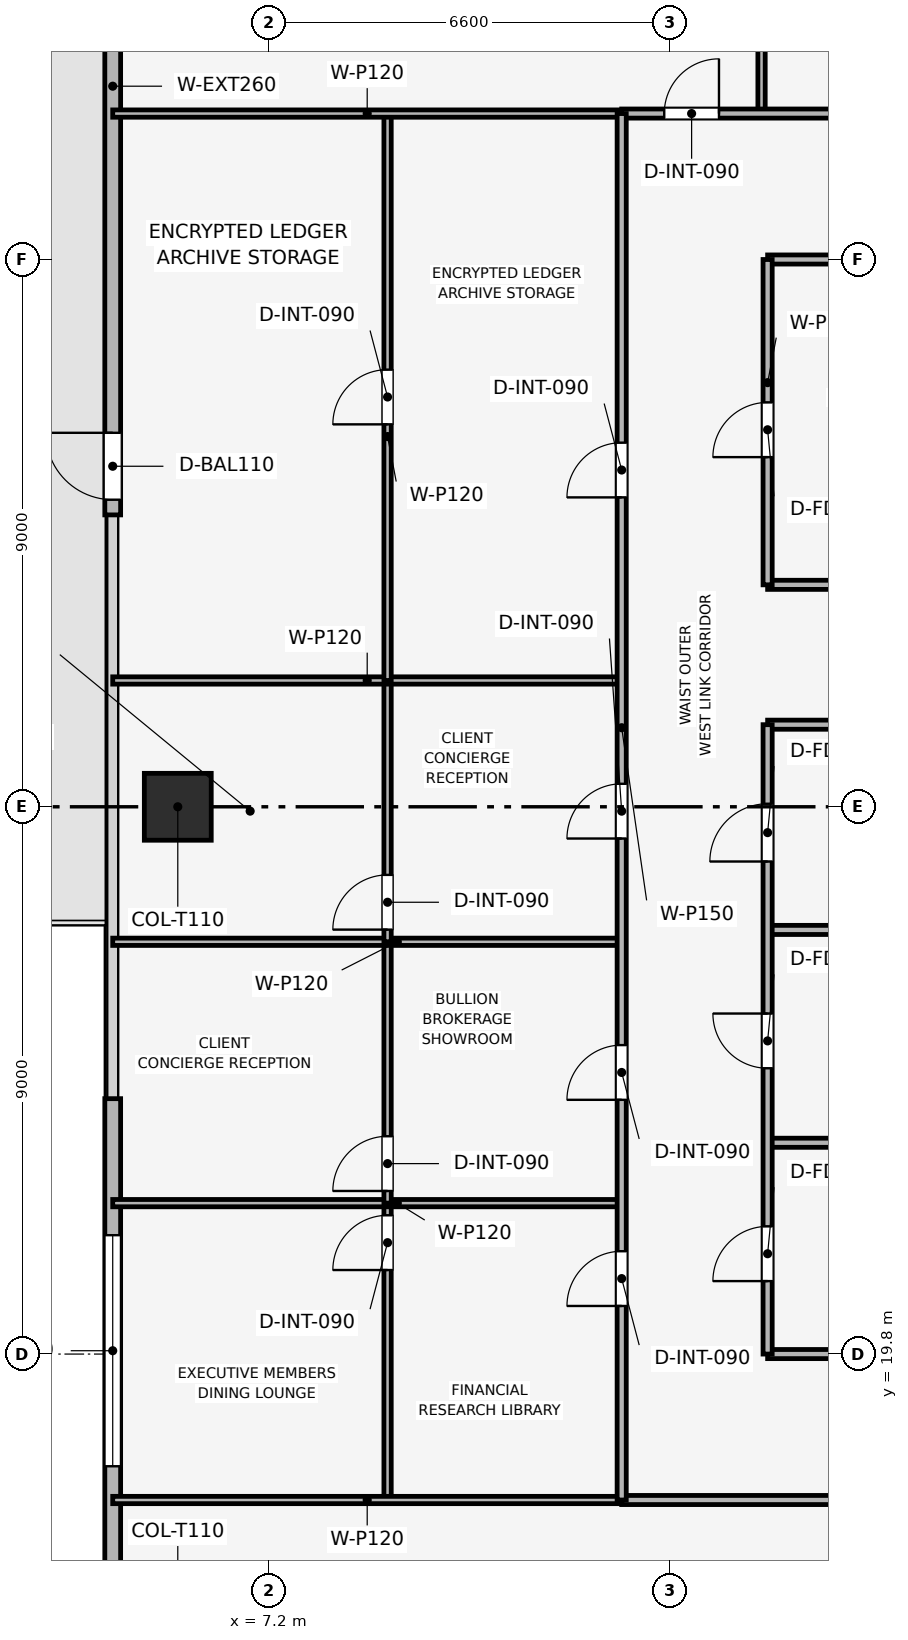
"""IFC4 building model, lengths in metres.
Left out: names, types, materials, properties, quantities, classifications, styles, units other than length and angle.
Written with IfcOpenShell. Run it as: python <this file> out.ifc"""

import sys

from ifc_helpers import new_model, si_unit, direction, frame, frame_2d, origin, origin_2d, place, context, subcontext, project, spatial, rectangle, extrude, element, fill, save


model = new_model("IFC4")
c1 = context("Model", 3, precision=1e-05, world=origin(), true_north=direction((0.0, 1.0)))
c2 = subcontext(c1, "Body", "Model", "MODEL_VIEW")
j1 = project(units=[si_unit("LENGTHUNIT", "METRE"), si_unit("PLANEANGLEUNIT", "RADIAN")], contexts=[c1])
p1 = place(None, origin())
s1 = spatial("IfcSite", under=j1, at=p1, CompositionType="ELEMENT")
p2 = place(p1, origin())
s2 = spatial("IfcBuilding", under=s1, at=p2, CompositionType="ELEMENT")
p3 = place(p2, frame((0.0, 0.0, 172.05)))
s3 = spatial("IfcBuildingStorey", under=s2, at=p3, CompositionType="ELEMENT", Elevation=172.05)
p4 = place(p3, frame((5.7, 28.8, 0.003), z_axis=(0.0, 0.0, 1.0), x_axis=(1.0, 0.0, 0.0)))
e1 = element("IfcColumn", 1, at=p4, inside=s3, PredefinedType="COLUMN", context=c2, shape_type="SweptSolid", body=[
    extrude(rectangle(XDim=1.1, YDim=1.1, at=origin_2d()), origin(), (0.0, 0.0, 1.0), 3.489),
])
p5 = place(p3, frame((4.63, 11.4, 0.0), z_axis=(0.0, 0.0, 1.0), x_axis=(0.0, 1.0, 0.0)))
e2 = element("IfcWall", 2, at=p5, inside=s3, PredefinedType="SOLIDWALL", context=c2, shape_type="SweptSolid", body=[
    extrude(rectangle(XDim=12.6, YDim=0.26, at=frame_2d((6.3, 0.0))), origin(), (0.0, 0.0, 1.0), 3.495),
])
p6 = place(p5, frame((6.555, 0.0, 0.9)))
e3 = element("IfcOpeningElement", 3, at=p6, cuts=e2, PredefinedType="OPENING", context=c2, shape_type="SweptSolid", body=[
    extrude(rectangle(XDim=3.8, YDim=1.9, at=frame_2d((1.9, 0.95))), frame((0.0, 0.14, 0.0), z_axis=(0.0, -1.0, 0.0), x_axis=(1.0, 0.0, 0.0)), (0.0, 0.0, 1.0), 0.28),
])
p7 = place(p3, frame((4.63, 33.6, 0.0), z_axis=(0.0, 0.0, 1.0), x_axis=(0.0, 1.0, 0.0)))
e4 = element("IfcWall", 4, at=p7, inside=s3, PredefinedType="SOLIDWALL", context=c2, shape_type="SweptSolid", body=[
    extrude(rectangle(XDim=12.6, YDim=0.26, at=frame_2d((6.3, 0.0))), origin(), (0.0, 0.0, 1.0), 3.495),
])
p8 = place(p7, frame((0.25, 0.0, 0.0)))
e5 = element("IfcOpeningElement", 5, at=p8, cuts=e4, PredefinedType="OPENING", context=c2, shape_type="SweptSolid", body=[
    extrude(rectangle(XDim=1.1, YDim=2.2, at=frame_2d((0.55, 1.1))), frame((0.0, 0.14, 0.0), z_axis=(0.0, -1.0, 0.0), x_axis=(1.0, 0.0, 0.0)), (0.0, 0.0, 1.0), 0.28),
])
p9 = place(p3, frame((15.4, 19.8, 0.0), z_axis=(0.0, 0.0, 1.0), x_axis=(1.0, 0.0, 0.0)))
e6 = element("IfcWall", 6, at=p9, inside=s3, PredefinedType="PARTITIONING", context=c2, shape_type="SweptSolid", body=[
    extrude(rectangle(XDim=4.4, YDim=0.15, at=frame_2d((2.2, 0.0))), origin(), (0.0, 0.0, 1.0), 3.03),
])
for number, where, z_axis, x_axis in (
    (7, (15.4, 23.275, 0.0), (0.0, 0.0, 1.0), (1.0, 0.0, 0.0)),
    (8, (15.4, 26.775, 0.0), (0.0, 0.0, 1.0), (1.0, 0.0, 0.0)),
    (9, (15.4, 30.15, 0.0), (0.0, 0.0, 1.0), (1.0, 0.0, 0.0)),
    (10, (15.4, 32.45, 0.0), (0.0, 0.0, 1.0), (1.0, 0.0, 0.0)),
):
    element("IfcWall", number, at=place(p3, frame(where, z_axis=z_axis, x_axis=x_axis)), inside=s3, PredefinedType="PARTITIONING", context=c2, shape_type="SweptSolid", body=[
        extrude(rectangle(XDim=4.4, YDim=0.15, at=frame_2d((2.2, 0.0))), origin(), (0.0, 0.0, 1.0), 3.495),
    ])
p10 = place(p3, frame((15.4, 37.8, 0.0), z_axis=(0.0, 0.0, 1.0), x_axis=(1.0, 0.0, 0.0)))
e11 = element("IfcWall", 11, at=p10, inside=s3, PredefinedType="PARTITIONING", context=c2, shape_type="SweptSolid", body=[
    extrude(rectangle(XDim=4.4, YDim=0.15, at=frame_2d((2.2, 0.0))), origin(), (0.0, 0.0, 1.0), 3.03),
])
p11 = place(p3, frame((15.4, 19.8, 0.0), z_axis=(0.0, 0.0, 1.0), x_axis=(0.0, 1.0, 0.0)))
e12 = element("IfcWall", 12, at=p11, inside=s3, PredefinedType="PARTITIONING", context=c2, shape_type="SweptSolid", body=[
    extrude(rectangle(XDim=10.35, YDim=0.15, at=frame_2d((5.175, 0.0))), origin(), (0.0, 0.0, 1.0), 3.03),
])
p12 = place(p11, frame((1.2, 0.0, 0.0)))
e13 = element("IfcOpeningElement", 13, at=p12, cuts=e12, PredefinedType="OPENING", context=c2, shape_type="SweptSolid", body=[
    extrude(rectangle(XDim=0.9, YDim=2.1, at=frame_2d((0.45, 1.05))), frame((0.0, 0.085, 0.0), z_axis=(0.0, -1.0, 0.0), x_axis=(1.0, 0.0, 0.0)), (0.0, 0.0, 1.0), 0.17),
])
p13 = place(p11, frame((4.7, 0.0, 0.0)))
e14 = element("IfcOpeningElement", 14, at=p13, cuts=e12, PredefinedType="OPENING", context=c2, shape_type="SweptSolid", body=[
    extrude(rectangle(XDim=0.9, YDim=2.1, at=frame_2d((0.45, 1.05))), frame((0.0, 0.085, 0.0), z_axis=(0.0, -1.0, 0.0), x_axis=(1.0, 0.0, 0.0)), (0.0, 0.0, 1.0), 0.17),
])
p14 = place(p11, frame((8.1, 0.0, 0.0)))
e15 = element("IfcOpeningElement", 15, at=p14, cuts=e12, PredefinedType="OPENING", context=c2, shape_type="SweptSolid", body=[
    extrude(rectangle(XDim=0.95, YDim=2.1, at=frame_2d((0.475, 1.05))), frame((0.0, 0.085, 0.0), z_axis=(0.0, -1.0, 0.0), x_axis=(1.0, 0.0, 0.0)), (0.0, 0.0, 1.0), 0.17),
])
p15 = place(p3, frame((15.4, 32.45, 0.0), z_axis=(0.0, 0.0, 1.0), x_axis=(0.0, 1.0, 0.0)))
e16 = element("IfcWall", 16, at=p15, inside=s3, PredefinedType="PARTITIONING", context=c2, shape_type="SweptSolid", body=[
    extrude(rectangle(XDim=5.35, YDim=0.15, at=frame_2d((2.675, 0.0))), origin(), (0.0, 0.0, 1.0), 3.03),
])
p16 = place(p15, frame((2.1, 0.0, 0.0)))
e17 = element("IfcOpeningElement", 17, at=p16, cuts=e16, PredefinedType="OPENING", context=c2, shape_type="SweptSolid", body=[
    extrude(rectangle(XDim=0.9, YDim=2.1, at=frame_2d((0.45, 1.05))), frame((0.0, 0.085, 0.0), z_axis=(0.0, -1.0, 0.0), x_axis=(1.0, 0.0, 0.0)), (0.0, 0.0, 1.0), 0.17),
])
p17 = place(p3, frame((15.3, 40.2, 0.0), z_axis=(0.0, 0.0, 1.0), x_axis=(0.0, 1.0, 0.0)))
e18 = element("IfcWall", 18, at=p17, inside=s3, PredefinedType="PARTITIONING", context=c2, shape_type="SweptSolid", body=[
    extrude(rectangle(XDim=12.77, YDim=0.12, at=frame_2d((6.385, 0.0))), origin(), (0.0, 0.0, 1.0), 2.98),
])
p18 = place(p3, frame((9.15, 17.4, 0.0), z_axis=(0.0, 0.0, 1.0), x_axis=(0.0, 1.0, 0.0)))
e19 = element("IfcWall", 19, at=p18, inside=s3, PredefinedType="PARTITIONING", context=c2, shape_type="SweptSolid", body=[
    extrude(rectangle(XDim=4.882, YDim=0.12, at=frame_2d((2.441, 0.0))), origin(), (0.0, 0.0, 1.0), 3.03),
])
p19 = place(p18, frame((3.782, 0.0, 0.0)))
e20 = element("IfcOpeningElement", 20, at=p19, cuts=e19, PredefinedType="OPENING", context=c2, shape_type="SweptSolid", body=[
    extrude(rectangle(XDim=0.9, YDim=2.1, at=frame_2d((0.45, 1.05))), frame((0.0, 0.07, 0.0), z_axis=(0.0, -1.0, 0.0), x_axis=(1.0, 0.0, 0.0)), (0.0, 0.0, 1.0), 0.14),
])
p20 = place(p3, frame((4.63, 22.282, 0.0), z_axis=(0.0, 0.0, 1.0), x_axis=(1.0, 0.0, 0.0)))
e21 = element("IfcWall", 21, at=p20, inside=s3, PredefinedType="PARTITIONING", context=c2, shape_type="SweptSolid", body=[
    extrude(rectangle(XDim=8.37, YDim=0.12, at=frame_2d((4.185, 0.0))), origin(), (0.0, 0.0, 1.0), 2.98),
])
p21 = place(p3, frame((9.15, 22.282, 0.0), z_axis=(0.0, 0.0, 1.0), x_axis=(0.0, 1.0, 0.0)))
e22 = element("IfcWall", 22, at=p21, inside=s3, PredefinedType="PARTITIONING", context=c2, shape_type="SweptSolid", body=[
    extrude(rectangle(XDim=4.298, YDim=0.12, at=frame_2d((2.149, 0.0))), origin(), (0.0, 0.0, 1.0), 3.495),
])
p22 = place(p21, frame((0.2, 0.0, 0.0)))
e23 = element("IfcOpeningElement", 23, at=p22, cuts=e22, PredefinedType="OPENING", context=c2, shape_type="SweptSolid", body=[
    extrude(rectangle(XDim=0.9, YDim=2.1, at=frame_2d((0.45, 1.05))), frame((0.0, 0.07, 0.0), z_axis=(0.0, -1.0, 0.0), x_axis=(1.0, 0.0, 0.0)), (0.0, 0.0, 1.0), 0.14),
])
p23 = place(p3, frame((4.63, 26.58, 0.0), z_axis=(0.0, 0.0, 1.0), x_axis=(1.0, 0.0, 0.0)))
e24 = element("IfcWall", 24, at=p23, inside=s3, PredefinedType="PARTITIONING", context=c2, shape_type="SweptSolid", body=[
    extrude(rectangle(XDim=8.37, YDim=0.12, at=frame_2d((4.185, 0.0))), origin(), (0.0, 0.0, 1.0), 2.98),
])
p24 = place(p3, frame((9.15, 26.58, 0.0), z_axis=(0.0, 0.0, 1.0), x_axis=(0.0, 1.0, 0.0)))
e25 = element("IfcWall", 25, at=p24, inside=s3, PredefinedType="PARTITIONING", context=c2, shape_type="SweptSolid", body=[
    extrude(rectangle(XDim=4.297, YDim=0.12, at=frame_2d((2.148, 0.0))), origin(), (0.0, 0.0, 1.0), 3.03),
])
p25 = place(p24, frame((0.2, 0.0, 0.0)))
e26 = element("IfcOpeningElement", 26, at=p25, cuts=e25, PredefinedType="OPENING", context=c2, shape_type="SweptSolid", body=[
    extrude(rectangle(XDim=0.9, YDim=2.1, at=frame_2d((0.45, 1.05))), frame((0.0, 0.07, 0.0), z_axis=(0.0, -1.0, 0.0), x_axis=(1.0, 0.0, 0.0)), (0.0, 0.0, 1.0), 0.14),
])
p26 = place(p3, frame((4.63, 30.877, 0.0), z_axis=(0.0, 0.0, 1.0), x_axis=(1.0, 0.0, 0.0)))
e27 = element("IfcWall", 27, at=p26, inside=s3, PredefinedType="PARTITIONING", context=c2, shape_type="SweptSolid", body=[
    extrude(rectangle(XDim=8.37, YDim=0.12, at=frame_2d((4.185, 0.0))), origin(), (0.0, 0.0, 1.0), 2.98),
])
p27 = place(p3, frame((9.15, 30.877, 0.0), z_axis=(0.0, 0.0, 1.0), x_axis=(0.0, 1.0, 0.0)))
e28 = element("IfcWall", 28, at=p27, inside=s3, PredefinedType="PARTITIONING", context=c2, shape_type="SweptSolid", body=[
    extrude(rectangle(XDim=9.323, YDim=0.12, at=frame_2d((4.662, 0.0))), origin(), (0.0, 0.0, 1.0), 3.03),
])
p28 = place(p27, frame((4.212, 0.0, 0.0)))
e29 = element("IfcOpeningElement", 29, at=p28, cuts=e28, PredefinedType="OPENING", context=c2, shape_type="SweptSolid", body=[
    extrude(rectangle(XDim=0.9, YDim=2.1, at=frame_2d((0.45, 1.05))), frame((0.0, 0.07, 0.0), z_axis=(0.0, -1.0, 0.0), x_axis=(1.0, 0.0, 0.0)), (0.0, 0.0, 1.0), 0.14),
])
for number, where, z_axis, x_axis in (
    (30, (4.63, 17.4, 0.0), (0.0, 0.0, 1.0), (1.0, 0.0, 0.0)),
    (31, (4.63, 40.2, 0.0), (0.0, 0.0, 1.0), (1.0, 0.0, 0.0)),
):
    element("IfcWall", number, at=place(p3, frame(where, z_axis=z_axis, x_axis=x_axis)), inside=s3, PredefinedType="PARTITIONING", context=c2, shape_type="SweptSolid", body=[
        extrude(rectangle(XDim=8.37, YDim=0.12, at=frame_2d((4.185, 0.0))), origin(), (0.0, 0.0, 1.0), 2.98),
    ])
p29 = place(p3, frame((13.0, 17.4, 0.0), z_axis=(0.0, 0.0, 1.0), x_axis=(1.0, 0.0, 0.0)))
e32 = element("IfcWall", 32, at=p29, inside=s3, PredefinedType="PARTITIONING", context=c2, shape_type="SweptSolid", body=[
    extrude(rectangle(XDim=31.6, YDim=0.15, at=frame_2d((15.8, 0.0))), origin(), (0.0, 0.0, 1.0), 3.03),
])
p30 = place(p29, frame((15.35, 0.0, 0.0)))
e33 = element("IfcOpeningElement", 33, at=p30, cuts=e32, PredefinedType="OPENING", context=c2, shape_type="SweptSolid", body=[
    extrude(rectangle(XDim=0.9, YDim=2.1, at=frame_2d((0.45, 1.05))), frame((0.0, 0.085, 0.0), z_axis=(0.0, -1.0, 0.0), x_axis=(1.0, 0.0, 0.0)), (0.0, 0.0, 1.0), 0.17),
])
p31 = place(p3, frame((13.0, 40.2, 0.0), z_axis=(0.0, 0.0, 1.0), x_axis=(1.0, 0.0, 0.0)))
e34 = element("IfcWall", 34, at=p31, inside=s3, PredefinedType="PARTITIONING", context=c2, shape_type="SweptSolid", body=[
    extrude(rectangle(XDim=31.6, YDim=0.15, at=frame_2d((15.8, 0.0))), origin(), (0.0, 0.0, 1.0), 3.03),
])
p32 = place(p31, frame((0.7, 0.0, 0.0)))
e35 = element("IfcOpeningElement", 35, at=p32, cuts=e34, PredefinedType="OPENING", context=c2, shape_type="SweptSolid", body=[
    extrude(rectangle(XDim=0.9, YDim=2.1, at=frame_2d((0.45, 1.05))), frame((0.0, 0.085, 0.0), z_axis=(0.0, -1.0, 0.0), x_axis=(1.0, 0.0, 0.0)), (0.0, 0.0, 1.0), 0.17),
])
p33 = place(p31, frame((8.515, 0.0, 0.0)))
e36 = element("IfcOpeningElement", 36, at=p33, cuts=e34, PredefinedType="OPENING", context=c2, shape_type="SweptSolid", body=[
    extrude(rectangle(XDim=0.9, YDim=2.1, at=frame_2d((0.45, 1.05))), frame((0.0, 0.085, 0.0), z_axis=(0.0, -1.0, 0.0), x_axis=(1.0, 0.0, 0.0)), (0.0, 0.0, 1.0), 0.17),
])
p34 = place(p31, frame((23.165, 0.0, 0.0)))
e37 = element("IfcOpeningElement", 37, at=p34, cuts=e34, PredefinedType="OPENING", context=c2, shape_type="SweptSolid", body=[
    extrude(rectangle(XDim=0.9, YDim=2.1, at=frame_2d((0.45, 1.05))), frame((0.0, 0.085, 0.0), z_axis=(0.0, -1.0, 0.0), x_axis=(1.0, 0.0, 0.0)), (0.0, 0.0, 1.0), 0.17),
])
p35 = place(p3, frame((13.0, 17.4, 0.0), z_axis=(0.0, 0.0, 1.0), x_axis=(0.0, 1.0, 0.0)))
e38 = element("IfcWall", 38, at=p35, inside=s3, PredefinedType="PARTITIONING", context=c2, shape_type="SweptSolid", body=[
    extrude(rectangle(XDim=22.8, YDim=0.15, at=frame_2d((11.4, 0.0))), origin(), (0.0, 0.0, 1.0), 3.03),
])
p36 = place(p35, frame((3.191, 0.0, 0.0)))
e39 = element("IfcOpeningElement", 39, at=p36, cuts=e38, PredefinedType="OPENING", context=c2, shape_type="SweptSolid", body=[
    extrude(rectangle(XDim=0.9, YDim=2.1, at=frame_2d((0.45, 1.05))), frame((0.0, 0.085, 0.0), z_axis=(0.0, -1.0, 0.0), x_axis=(1.0, 0.0, 0.0)), (0.0, 0.0, 1.0), 0.17),
])
p37 = place(p35, frame((6.581, 0.0, 0.0)))
e40 = element("IfcOpeningElement", 40, at=p37, cuts=e38, PredefinedType="OPENING", context=c2, shape_type="SweptSolid", body=[
    extrude(rectangle(XDim=0.9, YDim=2.1, at=frame_2d((0.45, 1.05))), frame((0.0, 0.085, 0.0), z_axis=(0.0, -1.0, 0.0), x_axis=(1.0, 0.0, 0.0)), (0.0, 0.0, 1.0), 0.17),
])
p38 = place(p35, frame((10.878, 0.0, 0.0)))
e41 = element("IfcOpeningElement", 41, at=p38, cuts=e38, PredefinedType="OPENING", context=c2, shape_type="SweptSolid", body=[
    extrude(rectangle(XDim=0.9, YDim=2.1, at=frame_2d((0.45, 1.05))), frame((0.0, 0.085, 0.0), z_axis=(0.0, -1.0, 0.0), x_axis=(1.0, 0.0, 0.0)), (0.0, 0.0, 1.0), 0.17),
])
p39 = place(p35, frame((16.488, 0.0, 0.0)))
e42 = element("IfcOpeningElement", 42, at=p39, cuts=e38, PredefinedType="OPENING", context=c2, shape_type="SweptSolid", body=[
    extrude(rectangle(XDim=0.9, YDim=2.1, at=frame_2d((0.45, 1.05))), frame((0.0, 0.085, 0.0), z_axis=(0.0, -1.0, 0.0), x_axis=(1.0, 0.0, 0.0)), (0.0, 0.0, 1.0), 0.17),
])
p40 = place(p8, origin())
e43 = element("IfcDoor", 43, at=p40, inside=s3, OperationType="SINGLE_SWING_RIGHT", PredefinedType="DOOR", context=c2, shape_type="SweptSolid", body=[
    extrude(rectangle(XDim=1.1, YDim=2.2, at=frame_2d((0.55, 1.1))), frame((0.0, 0.025, 0.0), z_axis=(0.0, -1.0, 0.0), x_axis=(1.0, 0.0, 0.0)), (0.0, 0.0, 1.0), 0.05),
])
fill(e5, e43)
p41 = place(p6, origin())
e44 = element("IfcWindow", 44, at=p41, inside=s3, PartitioningType="SINGLE_PANEL", PredefinedType="WINDOW", context=c2, shape_type="SweptSolid", body=[
    extrude(rectangle(XDim=3.8, YDim=1.9, at=frame_2d((1.9, 0.95))), frame((0.0, 0.03, 0.0), z_axis=(0.0, -1.0, 0.0), x_axis=(1.0, 0.0, 0.0)), (0.0, 0.0, 1.0), 0.06),
])
fill(e3, e44)
p42 = place(p12, origin())
e45 = element("IfcDoor", 45, at=p42, inside=s3, OperationType="SINGLE_SWING_LEFT", PredefinedType="DOOR", context=c2, shape_type="SweptSolid", body=[
    extrude(rectangle(XDim=0.9, YDim=2.1, at=frame_2d((0.45, 1.05))), frame((0.0, 0.025, 0.0), z_axis=(0.0, -1.0, 0.0), x_axis=(1.0, 0.0, 0.0)), (0.0, 0.0, 1.0), 0.05),
])
fill(e13, e45)
p43 = place(p13, origin())
e46 = element("IfcDoor", 46, at=p43, inside=s3, OperationType="SINGLE_SWING_RIGHT", PredefinedType="DOOR", context=c2, shape_type="SweptSolid", body=[
    extrude(rectangle(XDim=0.9, YDim=2.1, at=frame_2d((0.45, 1.05))), frame((0.0, 0.025, 0.0), z_axis=(0.0, -1.0, 0.0), x_axis=(1.0, 0.0, 0.0)), (0.0, 0.0, 1.0), 0.05),
])
fill(e14, e46)
p44 = place(p14, origin())
e47 = element("IfcDoor", 47, at=p44, inside=s3, OperationType="SINGLE_SWING_LEFT", PredefinedType="DOOR", context=c2, shape_type="SweptSolid", body=[
    extrude(rectangle(XDim=0.95, YDim=2.1, at=frame_2d((0.475, 1.05))), frame((0.0, 0.025, 0.0), z_axis=(0.0, -1.0, 0.0), x_axis=(1.0, 0.0, 0.0)), (0.0, 0.0, 1.0), 0.05),
])
fill(e15, e47)
p45 = place(p16, origin())
e48 = element("IfcDoor", 48, at=p45, inside=s3, OperationType="SINGLE_SWING_LEFT", PredefinedType="DOOR", context=c2, shape_type="SweptSolid", body=[
    extrude(rectangle(XDim=0.9, YDim=2.1, at=frame_2d((0.45, 1.05))), frame((0.0, 0.025, 0.0), z_axis=(0.0, -1.0, 0.0), x_axis=(1.0, 0.0, 0.0)), (0.0, 0.0, 1.0), 0.05),
])
fill(e17, e48)
p46 = place(p19, origin())
e49 = element("IfcDoor", 49, at=p46, inside=s3, OperationType="SINGLE_SWING_LEFT", PredefinedType="DOOR", context=c2, shape_type="SweptSolid", body=[
    extrude(rectangle(XDim=0.9, YDim=2.1, at=frame_2d((0.45, 1.05))), frame((0.0, 0.025, 0.0), z_axis=(0.0, -1.0, 0.0), x_axis=(1.0, 0.0, 0.0)), (0.0, 0.0, 1.0), 0.05),
])
fill(e20, e49)
p47 = place(p22, origin())
e50 = element("IfcDoor", 50, at=p47, inside=s3, OperationType="SINGLE_SWING_LEFT", PredefinedType="DOOR", context=c2, shape_type="SweptSolid", body=[
    extrude(rectangle(XDim=0.9, YDim=2.1, at=frame_2d((0.45, 1.05))), frame((0.0, 0.025, 0.0), z_axis=(0.0, -1.0, 0.0), x_axis=(1.0, 0.0, 0.0)), (0.0, 0.0, 1.0), 0.05),
])
fill(e23, e50)
p48 = place(p25, origin())
e51 = element("IfcDoor", 51, at=p48, inside=s3, OperationType="SINGLE_SWING_LEFT", PredefinedType="DOOR", context=c2, shape_type="SweptSolid", body=[
    extrude(rectangle(XDim=0.9, YDim=2.1, at=frame_2d((0.45, 1.05))), frame((0.0, 0.025, 0.0), z_axis=(0.0, -1.0, 0.0), x_axis=(1.0, 0.0, 0.0)), (0.0, 0.0, 1.0), 0.05),
])
fill(e26, e51)
p49 = place(p28, origin())
e52 = element("IfcDoor", 52, at=p49, inside=s3, OperationType="SINGLE_SWING_LEFT", PredefinedType="DOOR", context=c2, shape_type="SweptSolid", body=[
    extrude(rectangle(XDim=0.9, YDim=2.1, at=frame_2d((0.45, 1.05))), frame((0.0, 0.025, 0.0), z_axis=(0.0, -1.0, 0.0), x_axis=(1.0, 0.0, 0.0)), (0.0, 0.0, 1.0), 0.05),
])
fill(e29, e52)
p50 = place(p32, origin())
e53 = element("IfcDoor", 53, at=p50, inside=s3, OperationType="SINGLE_SWING_RIGHT", PredefinedType="DOOR", context=c2, shape_type="SweptSolid", body=[
    extrude(rectangle(XDim=0.9, YDim=2.1, at=frame_2d((0.45, 1.05))), frame((0.0, 0.025, 0.0), z_axis=(0.0, -1.0, 0.0), x_axis=(1.0, 0.0, 0.0)), (0.0, 0.0, 1.0), 0.05),
])
fill(e35, e53)
p51 = place(p36, origin())
e54 = element("IfcDoor", 54, at=p51, inside=s3, OperationType="SINGLE_SWING_LEFT", PredefinedType="DOOR", context=c2, shape_type="SweptSolid", body=[
    extrude(rectangle(XDim=0.9, YDim=2.1, at=frame_2d((0.45, 1.05))), frame((0.0, 0.025, 0.0), z_axis=(0.0, -1.0, 0.0), x_axis=(1.0, 0.0, 0.0)), (0.0, 0.0, 1.0), 0.05),
])
fill(e39, e54)
p52 = place(p37, origin())
e55 = element("IfcDoor", 55, at=p52, inside=s3, OperationType="SINGLE_SWING_LEFT", PredefinedType="DOOR", context=c2, shape_type="SweptSolid", body=[
    extrude(rectangle(XDim=0.9, YDim=2.1, at=frame_2d((0.45, 1.05))), frame((0.0, 0.025, 0.0), z_axis=(0.0, -1.0, 0.0), x_axis=(1.0, 0.0, 0.0)), (0.0, 0.0, 1.0), 0.05),
])
fill(e40, e55)
p53 = place(p38, origin())
e56 = element("IfcDoor", 56, at=p53, inside=s3, OperationType="SINGLE_SWING_LEFT", PredefinedType="DOOR", context=c2, shape_type="SweptSolid", body=[
    extrude(rectangle(XDim=0.9, YDim=2.1, at=frame_2d((0.45, 1.05))), frame((0.0, 0.025, 0.0), z_axis=(0.0, -1.0, 0.0), x_axis=(1.0, 0.0, 0.0)), (0.0, 0.0, 1.0), 0.05),
])
fill(e41, e56)
p54 = place(p39, origin())
e57 = element("IfcDoor", 57, at=p54, inside=s3, OperationType="SINGLE_SWING_LEFT", PredefinedType="DOOR", context=c2, shape_type="SweptSolid", body=[
    extrude(rectangle(XDim=0.9, YDim=2.1, at=frame_2d((0.45, 1.05))), frame((0.0, 0.025, 0.0), z_axis=(0.0, -1.0, 0.0), x_axis=(1.0, 0.0, 0.0)), (0.0, 0.0, 1.0), 0.05),
])
fill(e42, e57)
save(model, sys.argv[1])
